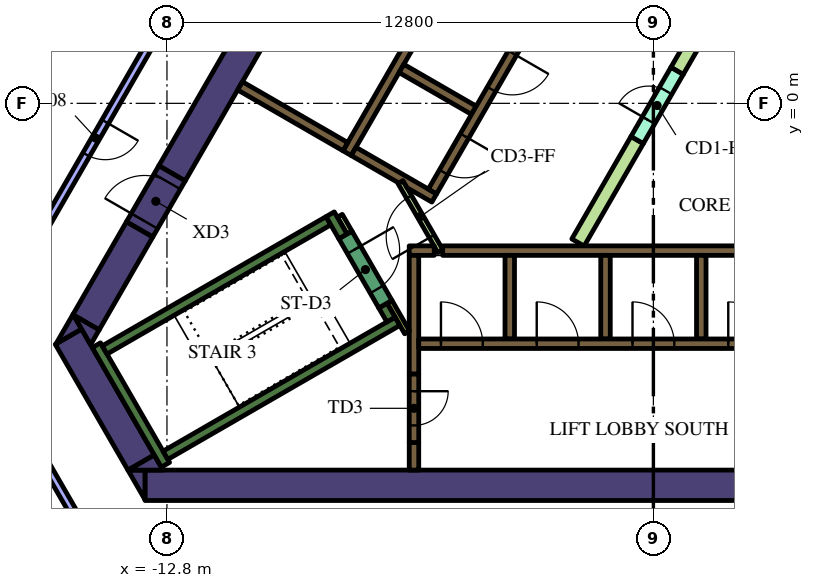
"""IFC4 building model, lengths in metres.
Left out: names, types, materials, properties, quantities, classifications, styles, units other than length and angle.
Written with IfcOpenShell. Run it as: python <this file> out.ifc"""

import sys

from ifc_helpers import new_model, si_unit, direction, frame, frame_2d, origin, place, context, subcontext, project, spatial, polyline, rectangle, outline, extrude, element, fill, save


model = new_model("IFC4")
c1 = context("Model", 3, precision=1e-05, world=origin(), true_north=direction((0.0, 1.0)))
c2 = subcontext(c1, "Body", "Model", "MODEL_VIEW")
j1 = project(units=[si_unit("LENGTHUNIT", "METRE"), si_unit("PLANEANGLEUNIT", "RADIAN")], contexts=[c1])
p1 = place(None, origin())
s1 = spatial("IfcSite", under=j1, at=p1, CompositionType="ELEMENT")
p2 = place(p1, origin())
s2 = spatial("IfcBuilding", under=s1, at=p2, CompositionType="ELEMENT")
p3 = place(p2, frame((0.0, 0.0, 187.8)))
s3 = spatial("IfcBuildingStorey", under=s2, at=p3, CompositionType="ELEMENT", Elevation=187.8)
p4 = place(p3, frame((-13.378, -10.05, 0.0), z_axis=(0.0, 0.0, 1.0), x_axis=(1.0, 0.0, 0.0)))
e1 = element("IfcWall", 1, at=p4, inside=s3, PredefinedType="SOLIDWALL", context=c2, shape_type="SweptSolid", body=[
    extrude(rectangle(XDim=22.282, YDim=0.8, at=frame_2d((11.141, 0.0))), origin(), (0.0, 0.0, 1.0), 4.2),
])
p5 = place(p3, origin())
e2 = element("IfcWall", 2, at=p5, inside=s3, PredefinedType="SOLIDWALL", context=c2, shape_type="SweptSolid", body=[
    extrude(outline(polyline([(-13.828, -9.65), (-13.38, -9.65), (-13.38, -10.426), (-13.828, -9.65)])), origin(), (0.0, 0.0, 1.0), 4.2),
])
p6 = place(p3, frame((-15.392, -6.14, 0.0), z_axis=(0.0, 0.0, 1.0), x_axis=(0.499984020225, -0.866034629516, 0.0)))
e3 = element("IfcWall", 3, at=p6, inside=s3, PredefinedType="SOLIDWALL", context=c2, shape_type="SweptSolid", body=[
    extrude(rectangle(XDim=3.824, YDim=0.8, at=frame_2d((1.912, 0.0))), origin(), (0.0, 0.0, 1.0), 4.2),
])
e4 = element("IfcWall", 4, at=p5, inside=s3, PredefinedType="SOLIDWALL", context=c2, shape_type="SweptSolid", body=[
    extrude(outline(polyline([(-15.047, -5.938), (-15.719, -6.326), (-15.271, -5.55), (-15.047, -5.938)])), origin(), (0.0, 0.0, 1.0), 4.2),
])
e5 = element("IfcWall", 5, at=p5, inside=s3, PredefinedType="SOLIDWALL", context=c2, shape_type="SweptSolid", body=[
    extrude(outline(polyline([(-12.904, -9.65), (-13.82, -9.65), (-13.133, -9.253), (-12.904, -9.65)])), origin(), (0.0, 0.0, 1.0), 4.2),
])
p7 = place(p3, frame((-13.518, -3.314, 0.0), z_axis=(0.0, 0.0, 1.0), x_axis=(-0.499969377405, -0.866043083026, 0.0)))
e6 = element("IfcWall", 6, at=p7, inside=s3, PredefinedType="SOLIDWALL", context=c2, shape_type="SweptSolid", body=[
    extrude(rectangle(XDim=2.824, YDim=0.8, at=frame_2d((1.412, 0.0))), origin(), (0.0, 0.0, 1.0), 4.2),
])
e7 = element("IfcWall", 7, at=p5, inside=s3, PredefinedType="SOLIDWALL", context=c2, shape_type="SweptSolid", body=[
    extrude(outline(polyline([(-14.809, -6.35), (-15.257, -5.574), (-14.585, -5.962), (-14.809, -6.35)])), origin(), (0.0, 0.0, 1.0), 4.2),
])
p8 = place(p3, frame((-12.668, -1.842, 0.0), z_axis=(0.0, 0.0, 1.0), x_axis=(0.500003640647, 0.866023301845, 0.0)))
e8 = element("IfcWall", 8, at=p8, inside=s3, PredefinedType="SOLIDWALL", context=c2, shape_type="SweptSolid", body=[
    extrude(rectangle(XDim=15.858, YDim=0.8, at=frame_2d((7.929, 0.0))), origin(), (0.0, 0.0, 1.0), 4.2),
])
p9 = place(p3, frame((-12.84, -9.511, 0.0), z_axis=(0.0, 0.0, 1.0), x_axis=(-0.499997733992, 0.866026712061, 0.0)))
e9 = element("IfcWall", 9, at=p9, inside=s3, PredefinedType="SOLIDWALL", context=c2, shape_type="SweptSolid", body=[
    extrude(rectangle(XDim=3.634, YDim=0.25, at=frame_2d((1.817, 0.0))), origin(), (0.0, 0.0, 1.0), 4.2),
])
p10 = place(p3, frame((-14.44, -6.49, 0.0), z_axis=(0.0, 0.0, 1.0), x_axis=(0.866022966069, 0.500004222222, 0.0)))
e10 = element("IfcWall", 10, at=p10, inside=s3, PredefinedType="SOLIDWALL", context=c2, shape_type="SweptSolid", body=[
    extrude(rectangle(XDim=6.8, YDim=0.25, at=frame_2d((3.4, 0.0))), origin(), (0.0, 0.0, 1.0), 4.2),
])
p11 = place(p3, frame((-8.168, -3.503, 0.0), z_axis=(0.0, 0.0, 1.0), x_axis=(-0.499952099219, 0.866053057547, 0.0)))
e11 = element("IfcWall", 11, at=p11, inside=s3, PredefinedType="SOLIDWALL", context=c2, shape_type="SweptSolid", body=[
    extrude(rectangle(XDim=0.675, YDim=0.25, at=frame_2d((0.337, 0.0))), origin(), (0.0, 0.0, 1.0), 4.2),
])
p12 = place(p3, frame((-12.84, -9.261, 0.0), z_axis=(0.0, 0.0, 1.0), x_axis=(0.866016039709, 0.500016218704, 0.0)))
e12 = element("IfcWall", 12, at=p12, inside=s3, PredefinedType="SOLIDWALL", context=c2, shape_type="SweptSolid", body=[
    extrude(rectangle(XDim=7.05, YDim=0.25, at=frame_2d((3.525, 0.0))), origin(), (0.0, 0.0, 1.0), 4.2),
])
p13 = place(p3, frame((-6.905, -5.69, 0.0), z_axis=(0.0, 0.0, 1.0), x_axis=(-0.500402024738, 0.865793170242, 0.0)))
e13 = element("IfcWall", 13, at=p13, inside=s3, PredefinedType="SOLIDWALL", context=c2, shape_type="SweptSolid", body=[
    extrude(rectangle(XDim=0.425, YDim=0.25, at=frame_2d((0.212, 0.0))), origin(), (0.0, 0.0, 1.0), 4.2),
])
p14 = place(p3, frame((-6.3, -8.925, 0.0), z_axis=(0.0, 0.0, 1.0), x_axis=(0.0, -1.0, 0.0)))
e14 = element("IfcWall", 14, at=p14, inside=s3, PredefinedType="SOLIDWALL", context=c2, shape_type="SweptSolid", body=[
    extrude(rectangle(XDim=0.725, YDim=0.25, at=frame_2d((0.363, 0.0))), origin(), (0.0, 0.0, 1.0), 4.2),
])
p15 = place(p3, frame((-5.545, -3.875, 0.0), z_axis=(0.0, 0.0, 1.0), x_axis=(1.0, 0.0, 0.0)))
e15 = element("IfcWall", 15, at=p15, inside=s3, PredefinedType="SOLIDWALL", context=c2, shape_type="SweptSolid", body=[
    extrude(rectangle(XDim=11.97, YDim=0.25, at=frame_2d((5.985, 0.0))), origin(), (0.0, 0.0, 1.0), 4.2),
])
p16 = place(p3, frame((-6.425, -3.875, 0.0), z_axis=(0.0, 0.0, 1.0), x_axis=(1.0, 0.0, 0.0)))
e16 = element("IfcWall", 16, at=p16, inside=s3, PredefinedType="SOLIDWALL", context=c2, shape_type="SweptSolid", body=[
    extrude(rectangle(XDim=0.658, YDim=0.25, at=frame_2d((0.329, 0.0))), origin(), (0.0, 0.0, 1.0), 4.2),
])
for number, where, z_axis, x_axis in (
    (17, (1.26, -4.0, 0.0), (0.0, 0.0, 1.0), (0.0, -1.0, 0.0)),
    (18, (-1.26, -4.0, 0.0), (0.0, 0.0, 1.0), (0.0, -1.0, 0.0)),
    (19, (-3.78, -4.0, 0.0), (0.0, 0.0, 1.0), (0.0, -1.0, 0.0)),
):
    element("IfcWall", number, at=place(p3, frame(where, z_axis=z_axis, x_axis=x_axis)), inside=s3, PredefinedType="SOLIDWALL", context=c2, shape_type="SweptSolid", body=[
        extrude(rectangle(XDim=2.2, YDim=0.25, at=frame_2d((1.1, 0.0))), origin(), (0.0, 0.0, 1.0), 4.2),
    ])
p17 = place(p3, frame((-6.3, -7.125, 0.0), z_axis=(0.0, 0.0, 1.0), x_axis=(0.0, 1.0, 0.0)))
e20 = element("IfcWall", 20, at=p17, inside=s3, PredefinedType="SOLIDWALL", context=c2, shape_type="SweptSolid", body=[
    extrude(rectangle(XDim=3.125, YDim=0.25, at=frame_2d((1.562, 0.0))), origin(), (0.0, 0.0, 1.0), 4.2),
])
p18 = place(p3, frame((6.568, -3.627, 0.0), z_axis=(0.0, 0.0, 1.0), x_axis=(-0.499999455981, 0.866025717874, 0.0)))
e21 = element("IfcWall", 21, at=p18, inside=s3, PredefinedType="SOLIDWALL", context=c2, shape_type="SweptSolid", body=[
    extrude(rectangle(XDim=11.978, YDim=0.25, at=frame_2d((5.989, 0.0))), origin(), (0.0, 0.0, 1.0), 4.2),
])
p19 = place(p3, frame((-8.06, -1.311, 0.0), z_axis=(0.0, 0.0, 1.0), x_axis=(0.50000273126, 0.866023826885, 0.0)))
e22 = element("IfcWall", 22, at=p19, inside=s3, PredefinedType="SOLIDWALL", context=c2, shape_type="SweptSolid", body=[
    extrude(rectangle(XDim=10.33, YDim=0.25, at=frame_2d((5.165, 0.0))), origin(), (0.0, 0.0, 1.0), 4.2),
])
p20 = place(p3, frame((-4.724, -0.182, 0.0), z_axis=(0.0, 0.0, 1.0), x_axis=(-0.866008176907, 0.50002983664, 0.0)))
e23 = element("IfcWall", 23, at=p20, inside=s3, PredefinedType="SOLIDWALL", context=c2, shape_type="SweptSolid", body=[
    extrude(rectangle(XDim=2.2, YDim=0.25, at=frame_2d((1.1, 0.0))), origin(), (0.0, 0.0, 1.0), 4.2),
])
e24 = element("IfcWall", 24, at=p5, inside=s3, PredefinedType="SOLIDWALL", context=c2, shape_type="SweptSolid", body=[
    extrude(outline(polyline([(-5.922, -2.257), (-5.922, -2.257), (-5.705, -2.382), (-5.83, -2.598), (-6.483, -2.221), (-6.591, -2.033), (-6.591, -2.033), (-6.7, -2.096), (-7.952, -1.373), (-7.827, -1.156), (-5.922, -2.257)])), origin(), (0.0, 0.0, 1.0), 4.2),
])
p21 = place(p3, frame((-8.106, -1.14, 0.0), z_axis=(0.0, 0.0, 1.0), x_axis=(-0.866008981251, 0.500028443584, 0.0)))
e25 = element("IfcWall", 25, at=p21, inside=s3, PredefinedType="SOLIDWALL", context=c2, shape_type="SweptSolid", body=[
    extrude(rectangle(XDim=3.2, YDim=0.25, at=frame_2d((1.6, 0.0))), origin(), (0.0, 0.0, 1.0), 4.2),
])
p22 = place(p3, frame((-8.252, -2.958, 0.0), z_axis=(0.0, 0.0, 1.0), x_axis=(0.500174715838, -0.865924508047, 0.0)))
e26 = element("IfcWall", 26, at=p22, inside=s3, PredefinedType="PARTITIONING", context=c2, shape_type="SweptSolid", body=[
    extrude(rectangle(XDim=0.514, YDim=0.15, at=frame_2d((0.257, 0.0))), origin(), (0.0, 0.0, 1.0), 3.15),
])
p23 = place(p3, frame((-6.48, -6.027, 0.0), z_axis=(0.0, 0.0, 1.0), x_axis=(-0.499927229454, 0.866067413802, 0.0)))
e27 = element("IfcWall", 27, at=p23, inside=s3, PredefinedType="PARTITIONING", context=c2, shape_type="SweptSolid", body=[
    extrude(rectangle(XDim=0.929, YDim=0.15, at=frame_2d((0.464, 0.0))), origin(), (0.0, 0.0, 1.0), 4.2),
])
e28 = element("IfcWall", 28, at=p5, inside=s3, PredefinedType="PARTITIONING", context=c2, shape_type="SweptSolid", body=[
    extrude(outline(polyline([(2.017, 3.643), (2.342, 3.456), (0.785, 0.76), (0.46, 0.947), (2.017, 3.643)])), origin(), (0.0, 0.0, 1.0), 3.15),
])
e29 = element("IfcWall", 29, at=p5, inside=s3, PredefinedType="PARTITIONING", context=c2, shape_type="SweptSolid", body=[
    extrude(outline(polyline([(-0.59, -0.872), (-0.265, -1.059), (-1.822, -3.756), (-2.147, -3.568), (-0.59, -0.872)])), origin(), (0.0, 0.0, 1.0), 3.15),
])
p24 = place(p3, frame((-6.175, -6.325, 0.0), z_axis=(0.0, 0.0, 1.0), x_axis=(1.0, 0.0, 0.0)))
e30 = element("IfcWall", 30, at=p24, inside=s3, PredefinedType="SOLIDWALL", context=c2, shape_type="SweptSolid", body=[
    extrude(rectangle(XDim=12.35, YDim=0.25, at=frame_2d((6.175, 0.0))), origin(), (0.0, 0.0, 1.0), 4.2),
])
p25 = place(p24, frame((0.585, 0.0, 0.0)))
e31 = element("IfcOpeningElement", 31, at=p25, cuts=e30, PredefinedType="OPENING", context=c2, shape_type="SweptSolid", body=[
    extrude(rectangle(XDim=1.1, YDim=2.1, at=frame_2d((0.55, 1.05))), frame((0.0, 0.135, 0.0), z_axis=(0.0, -1.0, 0.0), x_axis=(1.0, 0.0, 0.0)), (0.0, 0.0, 1.0), 0.27),
])
p26 = place(p24, frame((3.105, 0.0, 0.0)))
e32 = element("IfcOpeningElement", 32, at=p26, cuts=e30, PredefinedType="OPENING", context=c2, shape_type="SweptSolid", body=[
    extrude(rectangle(XDim=1.1, YDim=2.1, at=frame_2d((0.55, 1.05))), frame((0.0, 0.135, 0.0), z_axis=(0.0, -1.0, 0.0), x_axis=(1.0, 0.0, 0.0)), (0.0, 0.0, 1.0), 0.27),
])
p27 = place(p24, frame((5.625, 0.0, 0.0)))
e33 = element("IfcOpeningElement", 33, at=p27, cuts=e30, PredefinedType="OPENING", context=c2, shape_type="SweptSolid", body=[
    extrude(rectangle(XDim=1.1, YDim=2.1, at=frame_2d((0.55, 1.05))), frame((0.0, 0.135, 0.0), z_axis=(0.0, -1.0, 0.0), x_axis=(1.0, 0.0, 0.0)), (0.0, 0.0, 1.0), 0.27),
])
p28 = place(p24, frame((8.145, 0.0, 0.0)))
e34 = element("IfcOpeningElement", 34, at=p28, cuts=e30, PredefinedType="OPENING", context=c2, shape_type="SweptSolid", body=[
    extrude(rectangle(XDim=1.1, YDim=2.1, at=frame_2d((0.55, 1.05))), frame((0.0, 0.135, 0.0), z_axis=(0.0, -1.0, 0.0), x_axis=(1.0, 0.0, 0.0)), (0.0, 0.0, 1.0), 0.27),
])
p29 = place(p24, frame((10.665, 0.0, 0.0)))
e35 = element("IfcOpeningElement", 35, at=p29, cuts=e30, PredefinedType="OPENING", context=c2, shape_type="SweptSolid", body=[
    extrude(rectangle(XDim=1.1, YDim=2.1, at=frame_2d((0.55, 1.05))), frame((0.0, 0.135, 0.0), z_axis=(0.0, -1.0, 0.0), x_axis=(1.0, 0.0, 0.0)), (0.0, 0.0, 1.0), 0.27),
])
p30 = place(p3, frame((-0.898, 6.194, 0.0), z_axis=(0.0, 0.0, 1.0), x_axis=(-0.499996202215, -0.866027596426, 0.0)))
e36 = element("IfcWall", 36, at=p30, inside=s3, PredefinedType="SOLIDWALL", context=c2, shape_type="SweptSolid", body=[
    extrude(rectangle(XDim=9.83, YDim=0.25, at=frame_2d((4.915, 0.0))), origin(), (0.0, 0.0, 1.0), 4.2),
])
p31 = place(p30, frame((0.585, 0.0, 0.0)))
e37 = element("IfcOpeningElement", 37, at=p31, cuts=e36, PredefinedType="OPENING", context=c2, shape_type="SweptSolid", body=[
    extrude(rectangle(XDim=1.1, YDim=2.1, at=frame_2d((0.55, 1.05))), frame((0.0, 0.135, 0.0), z_axis=(0.0, -1.0, 0.0), x_axis=(1.0, 0.0, 0.0)), (0.0, 0.0, 1.0), 0.27),
])
p32 = place(p30, frame((3.105, 0.0, 0.0)))
e38 = element("IfcOpeningElement", 38, at=p32, cuts=e36, PredefinedType="OPENING", context=c2, shape_type="SweptSolid", body=[
    extrude(rectangle(XDim=1.1, YDim=2.1, at=frame_2d((0.55, 1.05))), frame((0.0, 0.135, 0.0), z_axis=(0.0, -1.0, 0.0), x_axis=(1.0, 0.0, 0.0)), (0.0, 0.0, 1.0), 0.27),
])
p33 = place(p30, frame((5.625, 0.0, 0.0)))
e39 = element("IfcOpeningElement", 39, at=p33, cuts=e36, PredefinedType="OPENING", context=c2, shape_type="SweptSolid", body=[
    extrude(rectangle(XDim=1.1, YDim=2.1, at=frame_2d((0.55, 1.05))), frame((0.0, 0.135, 0.0), z_axis=(0.0, -1.0, 0.0), x_axis=(1.0, 0.0, 0.0)), (0.0, 0.0, 1.0), 0.27),
])
p34 = place(p30, frame((8.145, 0.0, 0.0)))
e40 = element("IfcOpeningElement", 40, at=p34, cuts=e36, PredefinedType="OPENING", context=c2, shape_type="SweptSolid", body=[
    extrude(rectangle(XDim=1.1, YDim=2.1, at=frame_2d((0.55, 1.05))), frame((0.0, 0.135, 0.0), z_axis=(0.0, -1.0, 0.0), x_axis=(1.0, 0.0, 0.0)), (0.0, 0.0, 1.0), 0.27),
])
p35 = place(p3, frame((-8.103, -3.466, 0.0), z_axis=(0.0, 0.0, 1.0), x_axis=(0.500078061341, -0.865980330357, 0.0)))
e41 = element("IfcWall", 41, at=p35, inside=s3, PredefinedType="SOLIDWALL", context=c2, shape_type="SweptSolid", body=[
    extrude(rectangle(XDim=2.1, YDim=0.4, at=frame_2d((1.05, 0.0))), origin(), (0.0, 0.0, 1.0), 4.2),
])
p36 = place(p35, frame((0.45, 0.0, 0.0)))
e42 = element("IfcOpeningElement", 42, at=p36, cuts=e41, PredefinedType="OPENING", context=c2, shape_type="SweptSolid", body=[
    extrude(rectangle(XDim=1.2, YDim=2.1, at=frame_2d((0.6, 1.05))), frame((0.0, 0.21, 0.0), z_axis=(0.0, -1.0, 0.0), x_axis=(1.0, 0.0, 0.0)), (0.0, 0.0, 1.0), 0.42),
])
p37 = place(p3, frame((-6.3, -7.125, 0.0), z_axis=(0.0, 0.0, 1.0), x_axis=(0.0, -1.0, 0.0)))
e43 = element("IfcWall", 43, at=p37, inside=s3, PredefinedType="SOLIDWALL", context=c2, shape_type="SweptSolid", body=[
    extrude(rectangle(XDim=1.8, YDim=0.25, at=frame_2d((0.9, 0.0))), origin(), (0.0, 0.0, 1.0), 4.2),
])
p38 = place(p37, frame((0.45, 0.0, 0.0)))
e44 = element("IfcOpeningElement", 44, at=p38, cuts=e43, PredefinedType="OPENING", context=c2, shape_type="SweptSolid", body=[
    extrude(rectangle(XDim=0.9, YDim=2.1, at=frame_2d((0.45, 1.05))), frame((0.0, 0.135, 0.0), z_axis=(0.0, -1.0, 0.0), x_axis=(1.0, 0.0, 0.0)), (0.0, 0.0, 1.0), 0.27),
])
p39 = place(p3, frame((-0.427, -0.966, 0.0), z_axis=(0.0, 0.0, 1.0), x_axis=(0.49994051562, 0.866059744384, 0.0)))
e45 = element("IfcWall", 45, at=p39, inside=s3, PredefinedType="PARTITIONING", context=c2, shape_type="SweptSolid", body=[
    extrude(rectangle(XDim=2.1, YDim=0.375, at=frame_2d((1.05, 0.0))), origin(), (0.0, 0.0, 1.0), 3.15),
])
p40 = place(p39, frame((0.6, 0.0, 0.0)))
e46 = element("IfcOpeningElement", 46, at=p40, cuts=e45, PredefinedType="OPENING", context=c2, shape_type="SweptSolid", body=[
    extrude(rectangle(XDim=0.9, YDim=2.1, at=frame_2d((0.45, 1.05))), frame((0.0, 0.198, 0.0), z_axis=(0.0, -1.0, 0.0), x_axis=(1.0, 0.0, 0.0)), (0.0, 0.0, 1.0), 0.395),
])
p41 = place(p3, frame((-5.606, -3.89, 0.0), z_axis=(0.0, 0.0, 1.0), x_axis=(-0.500027713859, 0.866009402589, 0.0)))
e47 = element("IfcWall", 47, at=p41, inside=s3, PredefinedType="PARTITIONING", context=c2, shape_type="SweptSolid", body=[
    extrude(rectangle(XDim=2.1, YDim=0.15, at=frame_2d((1.05, 0.0))), origin(), (0.0, 0.0, 1.0), 3.15),
])
p42 = place(p41, frame((0.45, 0.0, 0.0)))
e48 = element("IfcOpeningElement", 48, at=p42, cuts=e47, PredefinedType="OPENING", context=c2, shape_type="SweptSolid", body=[
    extrude(rectangle(XDim=1.2, YDim=2.1, at=frame_2d((0.6, 1.05))), frame((0.0, 0.085, 0.0), z_axis=(0.0, -1.0, 0.0), x_axis=(1.0, 0.0, 0.0)), (0.0, 0.0, 1.0), 0.17),
])
p43 = place(p3, frame((-13.518, -3.314, 0.0), z_axis=(0.0, 0.0, 1.0), x_axis=(0.500000056704, 0.866025371046, 0.0)))
e49 = element("IfcWall", 49, at=p43, inside=s3, PredefinedType="SOLIDWALL", context=c2, shape_type="SweptSolid", body=[
    extrude(rectangle(XDim=1.7, YDim=0.8, at=frame_2d((0.85, 0.0))), origin(), (0.0, 0.0, 1.0), 4.2),
])
p44 = place(p43, frame((0.25, 0.0, 0.0)))
e50 = element("IfcOpeningElement", 50, at=p44, cuts=e49, PredefinedType="OPENING", context=c2, shape_type="SweptSolid", body=[
    extrude(rectangle(XDim=1.2, YDim=2.1, at=frame_2d((0.6, 1.05))), frame((0.0, 0.41, 0.0), z_axis=(0.0, -1.0, 0.0), x_axis=(1.0, 0.0, 0.0)), (0.0, 0.0, 1.0), 0.82),
])
p45 = place(p3, frame((-12.374, 3.068, 0.0), z_axis=(0.0, 0.0, 1.0), x_axis=(-0.50000000053, -0.866025403479, 0.0)))
e51 = element("IfcWall", 51, at=p45, inside=s3, PredefinedType="PARTITIONING", context=c2, shape_type="SweptSolid", body=[
    extrude(rectangle(XDim=9.188, YDim=0.2, at=frame_2d((4.594, 0.0))), origin(), (0.0, 0.0, 1.0), 3.15),
])
p46 = place(p45, frame((4.1, 0.0, 0.0)))
e52 = element("IfcOpeningElement", 52, at=p46, cuts=e51, PredefinedType="OPENING", context=c2, shape_type="SweptSolid", body=[
    extrude(rectangle(XDim=1.0, YDim=2.1, at=frame_2d((0.5, 1.05))), frame((0.0, 0.11, 0.0), z_axis=(0.0, -1.0, 0.0), x_axis=(1.0, 0.0, 0.0)), (0.0, 0.0, 1.0), 0.22),
])
p47 = place(p3, frame((-16.058, -9.387, 0.0), z_axis=(0.0, 0.0, 1.0), x_axis=(0.500046299512, -0.865998671098, 0.0)))
e53 = element("IfcWall", 53, at=p47, inside=s3, PredefinedType="PARTITIONING", context=c2, shape_type="SweptSolid", body=[
    extrude(rectangle(XDim=3.306, YDim=0.2, at=frame_2d((1.653, 0.0))), origin(), (0.0, 0.0, 1.0), 3.15),
])
p48 = place(p25, origin())
e54 = element("IfcDoor", 54, at=p48, inside=s3, OperationType="DOUBLE_DOOR_SLIDING", PredefinedType="DOOR", context=c2, shape_type="SweptSolid", body=[
    extrude(rectangle(XDim=1.1, YDim=2.1, at=frame_2d((0.55, 1.05))), frame((0.0, 0.025, 0.0), z_axis=(0.0, -1.0, 0.0), x_axis=(1.0, 0.0, 0.0)), (0.0, 0.0, 1.0), 0.05),
])
fill(e31, e54)
p49 = place(p26, origin())
e55 = element("IfcDoor", 55, at=p49, inside=s3, OperationType="DOUBLE_DOOR_SLIDING", PredefinedType="DOOR", context=c2, shape_type="SweptSolid", body=[
    extrude(rectangle(XDim=1.1, YDim=2.1, at=frame_2d((0.55, 1.05))), frame((0.0, 0.025, 0.0), z_axis=(0.0, -1.0, 0.0), x_axis=(1.0, 0.0, 0.0)), (0.0, 0.0, 1.0), 0.05),
])
fill(e32, e55)
p50 = place(p27, origin())
e56 = element("IfcDoor", 56, at=p50, inside=s3, OperationType="DOUBLE_DOOR_SLIDING", PredefinedType="DOOR", context=c2, shape_type="SweptSolid", body=[
    extrude(rectangle(XDim=1.1, YDim=2.1, at=frame_2d((0.55, 1.05))), frame((0.0, 0.025, 0.0), z_axis=(0.0, -1.0, 0.0), x_axis=(1.0, 0.0, 0.0)), (0.0, 0.0, 1.0), 0.05),
])
fill(e33, e56)
p51 = place(p28, origin())
e57 = element("IfcDoor", 57, at=p51, inside=s3, OperationType="DOUBLE_DOOR_SLIDING", PredefinedType="DOOR", context=c2, shape_type="SweptSolid", body=[
    extrude(rectangle(XDim=1.1, YDim=2.1, at=frame_2d((0.55, 1.05))), frame((0.0, 0.025, 0.0), z_axis=(0.0, -1.0, 0.0), x_axis=(1.0, 0.0, 0.0)), (0.0, 0.0, 1.0), 0.05),
])
fill(e34, e57)
p52 = place(p33, origin())
e58 = element("IfcDoor", 58, at=p52, inside=s3, OperationType="DOUBLE_DOOR_SLIDING", PredefinedType="DOOR", context=c2, shape_type="SweptSolid", body=[
    extrude(rectangle(XDim=1.1, YDim=2.1, at=frame_2d((0.55, 1.05))), frame((0.0, 0.025, 0.0), z_axis=(0.0, -1.0, 0.0), x_axis=(1.0, 0.0, 0.0)), (0.0, 0.0, 1.0), 0.05),
])
fill(e39, e58)
p53 = place(p34, origin())
e59 = element("IfcDoor", 59, at=p53, inside=s3, OperationType="DOUBLE_DOOR_SLIDING", PredefinedType="DOOR", context=c2, shape_type="SweptSolid", body=[
    extrude(rectangle(XDim=1.1, YDim=2.1, at=frame_2d((0.55, 1.05))), frame((0.0, 0.025, 0.0), z_axis=(0.0, -1.0, 0.0), x_axis=(1.0, 0.0, 0.0)), (0.0, 0.0, 1.0), 0.05),
])
fill(e40, e59)
p54 = place(p36, origin())
e60 = element("IfcDoor", 60, at=p54, inside=s3, OperationType="SINGLE_SWING_LEFT", PredefinedType="DOOR", context=c2, shape_type="SweptSolid", body=[
    extrude(rectangle(XDim=1.2, YDim=2.1, at=frame_2d((0.6, 1.05))), frame((0.0, 0.025, 0.0), z_axis=(0.0, -1.0, 0.0), x_axis=(1.0, 0.0, 0.0)), (0.0, 0.0, 1.0), 0.05),
])
fill(e42, e60)
p55 = place(p38, origin())
e61 = element("IfcDoor", 61, at=p55, inside=s3, OperationType="SINGLE_SWING_LEFT", PredefinedType="DOOR", context=c2, shape_type="SweptSolid", body=[
    extrude(rectangle(XDim=0.9, YDim=2.1, at=frame_2d((0.45, 1.05))), frame((0.0, 0.025, 0.0), z_axis=(0.0, -1.0, 0.0), x_axis=(1.0, 0.0, 0.0)), (0.0, 0.0, 1.0), 0.05),
])
fill(e44, e61)
p56 = place(p40, origin())
e62 = element("IfcDoor", 62, at=p56, inside=s3, OperationType="SINGLE_SWING_LEFT", PredefinedType="DOOR", context=c2, shape_type="SweptSolid", body=[
    extrude(rectangle(XDim=0.9, YDim=2.1, at=frame_2d((0.45, 1.05))), frame((0.0, 0.025, 0.0), z_axis=(0.0, -1.0, 0.0), x_axis=(1.0, 0.0, 0.0)), (0.0, 0.0, 1.0), 0.05),
])
fill(e46, e62)
p57 = place(p42, origin())
e63 = element("IfcDoor", 63, at=p57, inside=s3, OperationType="SINGLE_SWING_LEFT", PredefinedType="DOOR", context=c2, shape_type="SweptSolid", body=[
    extrude(rectangle(XDim=1.2, YDim=2.1, at=frame_2d((0.6, 1.05))), frame((0.0, 0.025, 0.0), z_axis=(0.0, -1.0, 0.0), x_axis=(1.0, 0.0, 0.0)), (0.0, 0.0, 1.0), 0.05),
])
fill(e48, e63)
p58 = place(p44, origin())
e64 = element("IfcDoor", 64, at=p58, inside=s3, OperationType="SINGLE_SWING_LEFT", PredefinedType="DOOR", context=c2, shape_type="SweptSolid", body=[
    extrude(rectangle(XDim=1.2, YDim=2.1, at=frame_2d((0.6, 1.05))), frame((0.0, 0.025, 0.0), z_axis=(0.0, -1.0, 0.0), x_axis=(1.0, 0.0, 0.0)), (0.0, 0.0, 1.0), 0.05),
])
fill(e50, e64)
p59 = place(p46, origin())
e65 = element("IfcDoor", 65, at=p59, inside=s3, OperationType="SINGLE_SWING_RIGHT", PredefinedType="DOOR", context=c2, shape_type="SweptSolid", body=[
    extrude(rectangle(XDim=1.0, YDim=2.1, at=frame_2d((0.5, 1.05))), frame((0.0, 0.025, 0.0), z_axis=(0.0, -1.0, 0.0), x_axis=(1.0, 0.0, 0.0)), (0.0, 0.0, 1.0), 0.05),
])
fill(e52, e65)
save(model, sys.argv[1])
